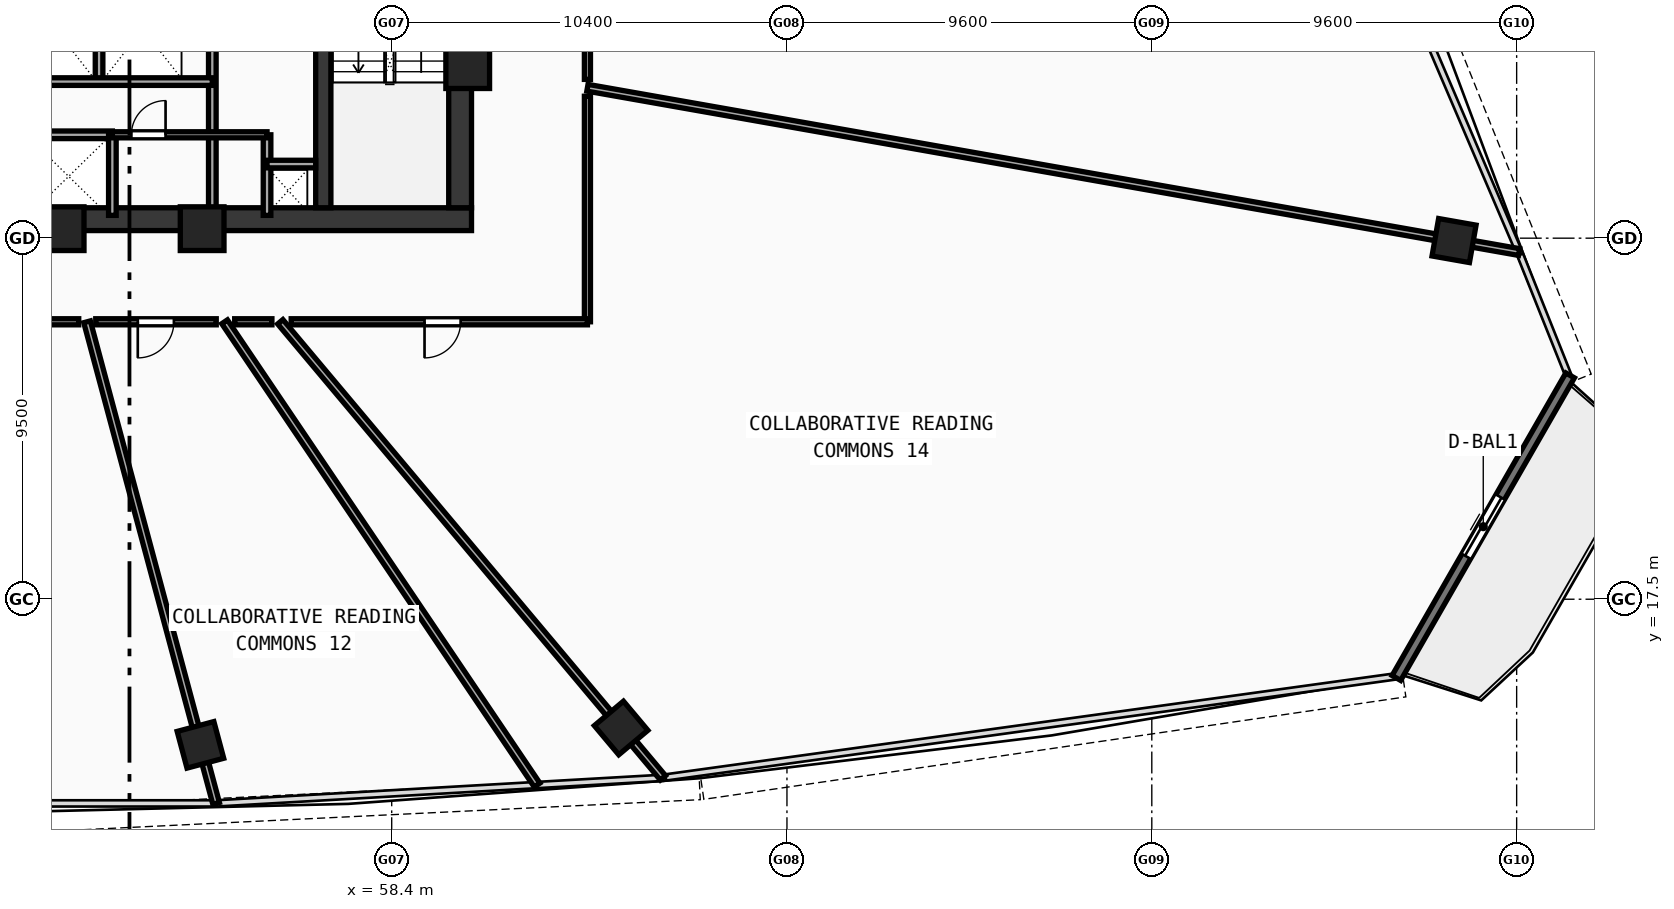
"""IFC4 building model, lengths in metres.
Left out: names, types, materials, properties, quantities, classifications, styles, units other than length and angle.
Written with IfcOpenShell. Run it as: python <this file> out.ifc"""

import sys

from ifc_helpers import new_model, si_unit, direction, frame, frame_2d, origin, origin_with_axes, origin_2d, place, context, subcontext, project, spatial, rectangle, hollow_rectangle, extrude, source, transform, mapped, element, fill, save


model = new_model("IFC4")
c1 = context("Model", 3, precision=1e-05, world=origin(), true_north=direction((0.0, 1.0)))
c2 = subcontext(c1, "Body", "Model", "MODEL_VIEW")
j1 = project(units=[si_unit("LENGTHUNIT", "METRE"), si_unit("PLANEANGLEUNIT", "RADIAN")], contexts=[c1])
p1 = place(None, origin())
s1 = spatial("IfcSite", under=j1, at=p1, CompositionType="ELEMENT")
p2 = place(p1, origin())
s2 = spatial("IfcBuilding", under=s1, at=p2, CompositionType="ELEMENT")
p3 = place(p2, frame((0.0, 0.0, 103.98)))
s3 = spatial("IfcBuildingStorey", under=s2, at=p3, CompositionType="ELEMENT", Elevation=103.98)
p4 = place(p3, frame((35.5, 27.5, 0.0), z_axis=(0.0, 0.0, 1.0), x_axis=(1.0, 0.0, 0.0)))
e1 = element("IfcWall", 1, at=p4, inside=s3, PredefinedType="SHEAR", context=c2, shape_type="SweptSolid", body=[
    extrude(rectangle(XDim=25.0, YDim=0.6, at=frame_2d((12.5, 0.0))), origin(), (0.0, 0.0, 1.0), 3.54),
])
p5 = place(p3, frame((60.2, 27.8, 0.0), z_axis=(0.0, 0.0, 1.0), x_axis=(0.0, 1.0, 0.0)))
e2 = element("IfcWall", 2, at=p5, inside=s3, PredefinedType="SHEAR", context=c2, shape_type="SweptSolid", body=[
    extrude(rectangle(XDim=12.1, YDim=0.6, at=frame_2d((6.05, 0.0))), origin(), (0.0, 0.0, 1.0), 3.54),
])
p6 = place(p3, frame((56.6, 27.8, 0.0), z_axis=(0.0, 0.0, 1.0), x_axis=(0.0, 1.0, 0.0)))
e3 = element("IfcWall", 3, at=p6, inside=s3, PredefinedType="SHEAR", context=c2, shape_type="SweptSolid", body=[
    extrude(rectangle(XDim=12.1, YDim=0.4, at=frame_2d((6.05, 0.0))), origin(), (0.0, 0.0, 1.0), 3.54),
])
p7 = place(p6, frame((9.95, 0.0, 0.0)))
e4 = element("IfcOpeningElement", 4, at=p7, cuts=e3, PredefinedType="OPENING", context=c2, shape_type="SweptSolid", body=[
    extrude(rectangle(XDim=1.1, YDim=2.1, at=frame_2d((0.55, 1.05))), frame((0.0, 0.21, 0.0), z_axis=(0.0, -1.0, 0.0), x_axis=(1.0, 0.0, 0.0)), (0.0, 0.0, 1.0), 0.42),
])
m1 = source(origin(), c2, "Body", "SweptSolid", [
    extrude(hollow_rectangle(XDim=1.15, YDim=1.15, WallThickness=0.048, at=origin_2d()), origin(), (0.0, 0.0, 1.0), 3.8),
])
for number, where, z_axis, x_axis in (
    (5, (49.729, 27.25, -0.26), (0.0, 0.0, 1.0), (1.0, 0.0, 0.0)),
    (6, (53.412, 27.25, -0.26), (0.0, 0.0, 1.0), (1.0, 0.0, 0.0)),
    (7, (60.4, 31.513, -0.26), (0.0, 0.0, 1.0), (1.0, 0.0, 0.0)),
):
    element("IfcColumn", number, at=place(p3, frame(where, z_axis=z_axis, x_axis=x_axis)), inside=s3, PredefinedType="COLUMN", context=c2, shape_type="MappedRepresentation", body=[
        mapped(m1, transform((0.0, 0.0, 0.0), scale=1.0)),
    ])
m2 = source(origin(), c2, "Body", "SweptSolid", [
    extrude(hollow_rectangle(XDim=1.0, YDim=1.0, WallThickness=0.042, at=origin_2d()), origin(), (0.0, 0.0, 1.0), 3.8),
])
for number, where, z_axis, x_axis in (
    (8, (53.367, 13.668, -0.26), (0.0, 0.0, 1.0), (0.966, 0.259, 0.0)),
    (9, (64.436, 14.112, -0.26), (0.0, 0.0, 1.0), (0.766, 0.643, 0.0)),
    (10, (86.353, 26.938, -0.26), (0.0, 0.0, 1.0), (0.174, 0.985, 0.0)),
):
    element("IfcColumn", number, at=place(p3, frame(where, z_axis=z_axis, x_axis=x_axis)), inside=s3, PredefinedType="COLUMN", context=c2, shape_type="MappedRepresentation", body=[
        mapped(m2, transform((0.0, 0.0, 0.0), scale=1.0)),
    ])
p8 = place(p3, frame((84.836, 15.428, 0.0), z_axis=(0.0, 0.0, 1.0), x_axis=(0.497913445573, 0.867226729707, 0.0)))
e11 = element("IfcWall", 11, at=p8, inside=s3, PredefinedType="STANDARD", context=c2, shape_type="SweptSolid", body=[
    extrude(rectangle(XDim=9.181, YDim=0.26, at=frame_2d((4.59, 0.0))), origin(), (0.0, 0.0, 1.0), 3.54),
])
p9 = place(p8, frame((3.69, 0.0, 0.0)))
e12 = element("IfcOpeningElement", 12, at=p9, cuts=e11, PredefinedType="OPENING", context=c2, shape_type="SweptSolid", body=[
    extrude(rectangle(XDim=1.8, YDim=2.15, at=frame_2d((0.9, 1.075))), frame((0.0, 0.14, 0.0), z_axis=(0.0, -1.0, 0.0), x_axis=(1.0, 0.0, 0.0)), (0.0, 0.0, 1.0), 0.28),
])
p10 = place(p3, frame((53.68, 27.6, 0.0), z_axis=(0.0, 0.0, 1.0), x_axis=(0.0, 1.0, 0.0)))
e13 = element("IfcWall", 13, at=p10, inside=s3, PredefinedType="SOLIDWALL", context=c2, shape_type="SweptSolid", body=[
    extrude(rectangle(XDim=9.05, YDim=0.2, at=frame_2d((4.525, 0.0))), origin(), (0.0, 0.0, 1.0), 3.54),
])
p11 = place(p10, frame((6.9, 0.0, 0.0)))
e14 = element("IfcOpeningElement", 14, at=p11, cuts=e13, PredefinedType="OPENING", context=c2, shape_type="SweptSolid", body=[
    extrude(rectangle(XDim=1.05, YDim=2.1, at=frame_2d((0.525, 1.05))), frame((0.0, 0.11, 0.0), z_axis=(0.0, -1.0, 0.0), x_axis=(1.0, 0.0, 0.0)), (0.0, 0.0, 1.0), 0.22),
])
p12 = place(p3, frame((50.7, 31.12, 0.0), z_axis=(0.0, 0.0, 1.0), x_axis=(0.0, 1.0, 0.0)))
e15 = element("IfcWall", 15, at=p12, inside=s3, PredefinedType="SOLIDWALL", context=c2, shape_type="SweptSolid", body=[
    extrude(rectangle(XDim=2.7, YDim=0.2, at=frame_2d((1.35, 0.0))), origin(), (0.0, 0.0, 1.0), 3.54),
])
p13 = place(p3, frame((43.85, 29.72, 0.0), z_axis=(0.0, 0.0, 1.0), x_axis=(1.0, 0.0, 0.0)))
e16 = element("IfcWall", 16, at=p13, inside=s3, PredefinedType="SOLIDWALL", context=c2, shape_type="SweptSolid", body=[
    extrude(rectangle(XDim=7.2, YDim=0.2, at=frame_2d((3.6, 0.0))), origin(), (0.0, 0.0, 1.0), 3.54),
])
p14 = place(p3, frame((51.05, 27.6, 0.0), z_axis=(0.0, 0.0, 1.0), x_axis=(0.0, 1.0, 0.0)))
e17 = element("IfcWall", 17, at=p14, inside=s3, PredefinedType="SOLIDWALL", context=c2, shape_type="SweptSolid", body=[
    extrude(rectangle(XDim=2.12, YDim=0.2, at=frame_2d((1.06, 0.0))), origin(), (0.0, 0.0, 1.0), 3.54),
])
p15 = place(p3, frame((43.85, 31.12, 0.0), z_axis=(0.0, 0.0, 1.0), x_axis=(1.0, 0.0, 0.0)))
e18 = element("IfcWall", 18, at=p15, inside=s3, PredefinedType="SOLIDWALL", context=c2, shape_type="SweptSolid", body=[
    extrude(rectangle(XDim=9.83, YDim=0.2, at=frame_2d((4.915, 0.0))), origin(), (0.0, 0.0, 1.0), 3.54),
])
p16 = place(p3, frame((55.12, 27.6, 0.0), z_axis=(0.0, 0.0, 1.0), x_axis=(0.0, 1.0, 0.0)))
e19 = element("IfcWall", 19, at=p16, inside=s3, PredefinedType="SOLIDWALL", context=c2, shape_type="SweptSolid", body=[
    extrude(rectangle(XDim=2.12, YDim=0.2, at=frame_2d((1.06, 0.0))), origin(), (0.0, 0.0, 1.0), 3.54),
])
p17 = place(p3, frame((55.12, 28.95, 0.0), z_axis=(0.0, 0.0, 1.0), x_axis=(1.0, 0.0, 0.0)))
e20 = element("IfcWall", 20, at=p17, inside=s3, PredefinedType="SOLIDWALL", context=c2, shape_type="SweptSolid", body=[
    extrude(rectangle(XDim=1.28, YDim=0.2, at=frame_2d((0.64, 0.0))), origin(), (0.0, 0.0, 1.0), 3.54),
])
p18 = place(p3, frame((51.05, 29.72, 0.0), z_axis=(0.0, 0.0, 1.0), x_axis=(1.0, 0.0, 0.0)))
e21 = element("IfcWall", 21, at=p18, inside=s3, PredefinedType="PARTITIONING", context=c2, shape_type="SweptSolid", body=[
    extrude(rectangle(XDim=4.07, YDim=0.16, at=frame_2d((2.035, 0.0))), origin(), (0.0, 0.0, 1.0), 3.54),
])
p19 = place(p18, frame((0.5, 0.0, 0.0)))
e22 = element("IfcOpeningElement", 22, at=p19, cuts=e21, PredefinedType="OPENING", context=c2, shape_type="SweptSolid", body=[
    extrude(rectangle(XDim=0.9, YDim=2.1, at=frame_2d((0.45, 1.05))), frame((0.0, 0.09, 0.0), z_axis=(0.0, -1.0, 0.0), x_axis=(1.0, 0.0, 0.0)), (0.0, 0.0, 1.0), 0.18),
])
p20 = place(p3, frame((50.385, 24.8, 0.0), z_axis=(0.0, 0.0, 1.0), x_axis=(0.258820732199, -0.965925374231, 0.0)))
e23 = element("IfcWall", 23, at=p20, inside=s3, PredefinedType="PARTITIONING", context=c2, shape_type="SweptSolid", body=[
    extrude(rectangle(XDim=13.119, YDim=0.18, at=frame_2d((6.56, 0.0))), origin(), (0.0, 0.0, 1.0), 2.84),
])
p21 = place(p3, frame((54.003, 24.8, 0.0), z_axis=(0.0, 0.0, 1.0), x_axis=(0.559194755778, -0.829036323155, 0.0)))
e24 = element("IfcWall", 24, at=p21, inside=s3, PredefinedType="PARTITIONING", context=c2, shape_type="SweptSolid", body=[
    extrude(rectangle(XDim=14.702, YDim=0.18, at=frame_2d((7.351, 0.0))), origin(), (0.0, 0.0, 1.0), 2.84),
])
p22 = place(p3, frame((55.468, 24.8, 0.0), z_axis=(0.0, 0.0, 1.0), x_axis=(0.642779306778, -0.76605141001, 0.0)))
e25 = element("IfcWall", 25, at=p22, inside=s3, PredefinedType="PARTITIONING", context=c2, shape_type="SweptSolid", body=[
    extrude(rectangle(XDim=15.664, YDim=0.18, at=frame_2d((7.832, 0.0))), origin(), (0.0, 0.0, 1.0), 2.84),
])
p23 = place(p3, frame((63.55, 30.958, 0.0), z_axis=(0.0, 0.0, 1.0), x_axis=(0.984808331287, -0.173644898074, 0.0)))
e26 = element("IfcWall", 26, at=p23, inside=s3, PredefinedType="PARTITIONING", context=c2, shape_type="SweptSolid", body=[
    extrude(rectangle(XDim=24.893, YDim=0.18, at=frame_2d((12.446, 0.0))), origin(), (0.0, 0.0, 1.0), 2.84),
])
p24 = place(p3, frame((63.55, 40.731, 0.0), z_axis=(0.0, 0.0, 1.0), x_axis=(0.0, -1.0, 0.0)))
e27 = element("IfcWall", 27, at=p24, inside=s3, PredefinedType="PARTITIONING", context=c2, shape_type="SweptSolid", body=[
    extrude(rectangle(XDim=9.553, YDim=0.16, at=frame_2d((4.777, 0.0))), origin(), (0.0, 0.0, 1.0), 2.84),
])
p25 = place(p24, frame((4.302, 0.0, 0.0)))
e28 = element("IfcOpeningElement", 28, at=p25, cuts=e27, PredefinedType="OPENING", context=c2, shape_type="SweptSolid", body=[
    extrude(rectangle(XDim=0.95, YDim=2.1, at=frame_2d((0.475, 1.05))), frame((0.0, 0.09, 0.0), z_axis=(0.0, -1.0, 0.0), x_axis=(1.0, 0.0, 0.0)), (0.0, 0.0, 1.0), 0.18),
])
p26 = place(p3, frame((63.55, 30.735, 0.0), z_axis=(0.0, 0.0, 1.0), x_axis=(0.0, -1.0, 0.0)))
e29 = element("IfcWall", 29, at=p26, inside=s3, PredefinedType="PARTITIONING", context=c2, shape_type="SweptSolid", body=[
    extrude(rectangle(XDim=5.935, YDim=0.16, at=frame_2d((2.967, 0.0))), origin(), (0.0, 0.0, 1.0), 3.14),
])
p27 = place(p3, frame((63.55, 24.8, 0.0), z_axis=(0.0, 0.0, 1.0), x_axis=(-1.0, 0.0, 0.0)))
e30 = element("IfcWall", 30, at=p27, inside=s3, PredefinedType="PARTITIONING", context=c2, shape_type="SweptSolid", body=[
    extrude(rectangle(XDim=7.795, YDim=0.16, at=frame_2d((3.897, 0.0))), origin(), (0.0, 0.0, 1.0), 3.14),
])
p28 = place(p27, frame((3.336, 0.0, 0.0)))
e31 = element("IfcOpeningElement", 31, at=p28, cuts=e30, PredefinedType="OPENING", context=c2, shape_type="SweptSolid", body=[
    extrude(rectangle(XDim=0.95, YDim=2.1, at=frame_2d((0.475, 1.05))), frame((0.0, 0.09, 0.0), z_axis=(0.0, -1.0, 0.0), x_axis=(1.0, 0.0, 0.0)), (0.0, 0.0, 1.0), 0.18),
])
p29 = place(p3, frame((55.248, 24.8, 0.0), z_axis=(0.0, 0.0, 1.0), x_axis=(-1.0, 0.0, 0.0)))
e32 = element("IfcWall", 32, at=p29, inside=s3, PredefinedType="PARTITIONING", context=c2, shape_type="SweptSolid", body=[
    extrude(rectangle(XDim=0.979, YDim=0.16, at=frame_2d((0.49, 0.0))), origin(), (0.0, 0.0, 1.0), 2.84),
])
p30 = place(p3, frame((53.783, 24.8, 0.0), z_axis=(0.0, 0.0, 1.0), x_axis=(-1.0, 0.0, 0.0)))
e33 = element("IfcWall", 33, at=p30, inside=s3, PredefinedType="PARTITIONING", context=c2, shape_type="SweptSolid", body=[
    extrude(rectangle(XDim=3.171, YDim=0.16, at=frame_2d((1.585, 0.0))), origin(), (0.0, 0.0, 1.0), 3.54),
])
p31 = place(p30, frame((1.114, 0.0, 0.0)))
e34 = element("IfcOpeningElement", 34, at=p31, cuts=e33, PredefinedType="OPENING", context=c2, shape_type="SweptSolid", body=[
    extrude(rectangle(XDim=0.95, YDim=2.1, at=frame_2d((0.475, 1.05))), frame((0.0, 0.09, 0.0), z_axis=(0.0, -1.0, 0.0), x_axis=(1.0, 0.0, 0.0)), (0.0, 0.0, 1.0), 0.18),
])
p32 = place(p3, frame((50.165, 24.8, 0.0), z_axis=(0.0, 0.0, 1.0), x_axis=(-1.0, 0.0, 0.0)))
e35 = element("IfcWall", 35, at=p32, inside=s3, PredefinedType="PARTITIONING", context=c2, shape_type="SweptSolid", body=[
    extrude(rectangle(XDim=7.506, YDim=0.16, at=frame_2d((3.753, 0.0))), origin(), (0.0, 0.0, 1.0), 2.84),
])
p33 = place(p32, frame((3.278, 0.0, 0.0)))
e36 = element("IfcOpeningElement", 36, at=p33, cuts=e35, PredefinedType="OPENING", context=c2, shape_type="SweptSolid", body=[
    extrude(rectangle(XDim=0.95, YDim=2.1, at=frame_2d((0.475, 1.05))), frame((0.0, 0.09, 0.0), z_axis=(0.0, -1.0, 0.0), x_axis=(1.0, 0.0, 0.0)), (0.0, 0.0, 1.0), 0.18),
])
m3 = source(origin(), c2, "Body", "SweptSolid", [
    extrude(rectangle(XDim=1.8, YDim=2.15, at=frame_2d((0.9, 1.075))), frame((0.0, 0.025, 0.0), z_axis=(0.0, -1.0, 0.0), x_axis=(1.0, 0.0, 0.0)), (0.0, 0.0, 1.0), 0.05),
])
p34 = place(p9, origin_with_axes())
e37 = element("IfcDoor", 37, at=p34, inside=s3, OperationType="DOUBLE_DOOR_SLIDING", PredefinedType="DOOR", context=c2, shape_type="MappedRepresentation", body=[
    mapped(m3, transform((0.0, 0.0, 0.0), scale=1.0)),
])
fill(e12, e37)
m4 = source(origin(), c2, "Body", "SweptSolid", [
    extrude(rectangle(XDim=0.9, YDim=2.1, at=frame_2d((0.45, 1.05))), frame((0.0, 0.025, 0.0), z_axis=(0.0, -1.0, 0.0), x_axis=(1.0, 0.0, 0.0)), (0.0, 0.0, 1.0), 0.05),
])
p35 = place(p19, origin_with_axes())
e38 = element("IfcDoor", 38, at=p35, inside=s3, OperationType="SINGLE_SWING_RIGHT", PredefinedType="DOOR", context=c2, shape_type="MappedRepresentation", body=[
    mapped(m4, transform((0.0, 0.0, 0.0), scale=1.0)),
])
fill(e22, e38)
m5 = source(origin(), c2, "Body", "SweptSolid", [
    extrude(rectangle(XDim=0.95, YDim=2.1, at=frame_2d((0.475, 1.05))), frame((0.0, 0.025, 0.0), z_axis=(0.0, -1.0, 0.0), x_axis=(1.0, 0.0, 0.0)), (0.0, 0.0, 1.0), 0.05),
])
p36 = place(p31, origin_with_axes())
e39 = element("IfcDoor", 39, at=p36, inside=s3, OperationType="SINGLE_SWING_RIGHT", PredefinedType="DOOR", context=c2, shape_type="MappedRepresentation", body=[
    mapped(m5, transform((0.0, 0.0, 0.0), scale=1.0)),
])
fill(e34, e39)
p37 = place(p28, origin_with_axes())
e40 = element("IfcDoor", 40, at=p37, inside=s3, OperationType="SINGLE_SWING_RIGHT", PredefinedType="DOOR", context=c2, shape_type="MappedRepresentation", body=[
    mapped(m5, transform((0.0, 0.0, 0.0), scale=1.0)),
])
fill(e31, e40)
save(model, sys.argv[1])
